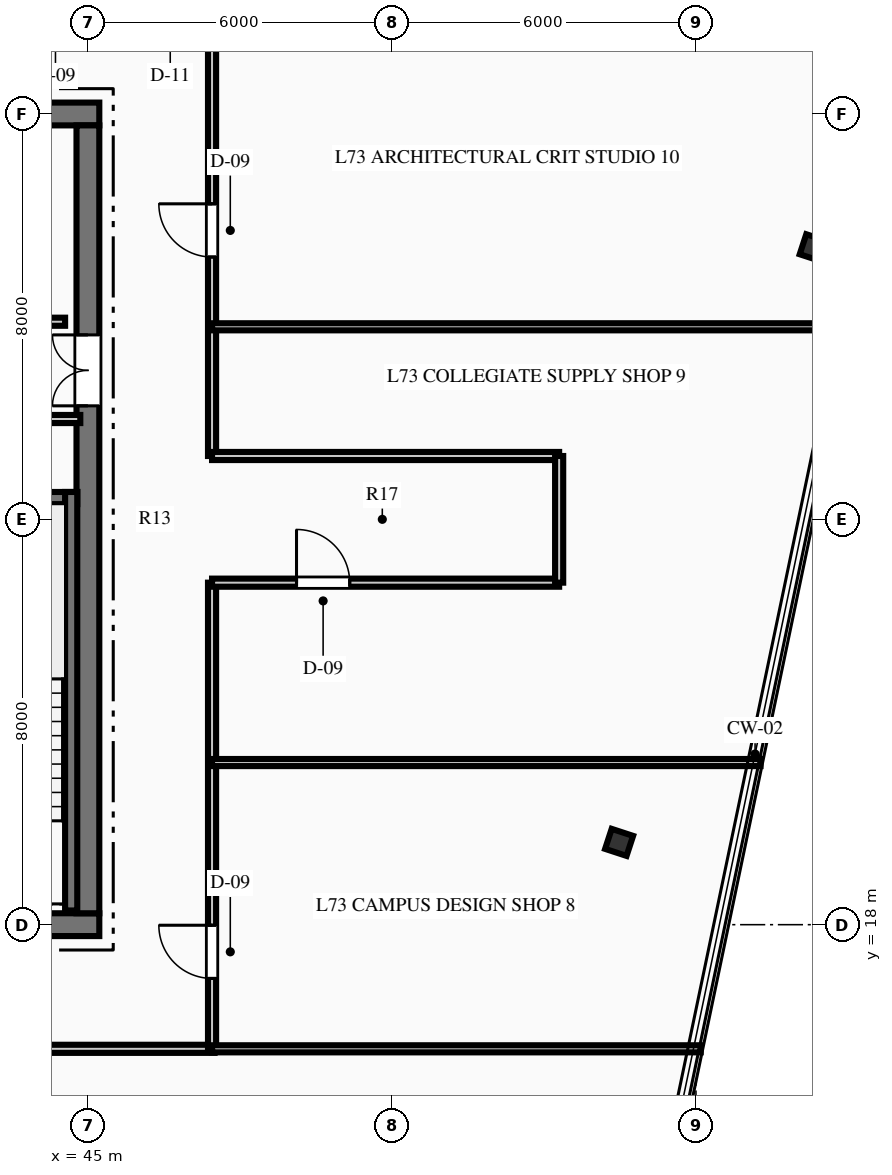
"""IFC4 building model, lengths in metres.
Left out: names, types, materials, properties, quantities, classifications, styles, units other than length and angle.
Written with IfcOpenShell. Run it as: python <this file> out.ifc"""

import sys

from ifc_helpers import new_model, si_unit, direction, frame, frame_2d, origin, origin_2d, place, context, subcontext, project, spatial, rectangle, i_section, extrude, element, fill, save


model = new_model("IFC4")
c1 = context("Model", 3, precision=1e-05, world=origin(), true_north=direction((0.0, 1.0)))
c2 = subcontext(c1, "Body", "Model", "MODEL_VIEW")
j1 = project(units=[si_unit("LENGTHUNIT", "METRE"), si_unit("PLANEANGLEUNIT", "RADIAN")], contexts=[c1])
p1 = place(None, origin())
s1 = spatial("IfcSite", under=j1, at=p1, CompositionType="ELEMENT")
p2 = place(p1, origin())
s2 = spatial("IfcBuilding", under=s1, at=p2, CompositionType="ELEMENT")
p3 = place(p2, frame((0.0, 0.0, 289.95)))
s3 = spatial("IfcBuildingStorey", under=s2, at=p3, CompositionType="ELEMENT", Elevation=289.95)
p4 = place(p3, frame((26.775, 18.0, 0.0), z_axis=(0.0, 0.0, 1.0), x_axis=(1.0, 0.0, 0.0)))
e1 = element("IfcWall", 1, at=p4, inside=s3, PredefinedType="SHEAR", context=c2, shape_type="SweptSolid", body=[
    extrude(rectangle(XDim=18.45, YDim=0.45, at=frame_2d((9.225, 0.0))), origin(), (0.0, 0.0, 1.0), 3.75),
])
p5 = place(p4, frame((7.325, 0.0, 0.0)))
e2 = element("IfcOpeningElement", 2, at=p5, cuts=e1, PredefinedType="OPENING", context=c2, shape_type="SweptSolid", body=[
    extrude(rectangle(XDim=1.1, YDim=2.15, at=frame_2d((0.55, 1.075))), frame((0.0, 0.235, 0.0), z_axis=(0.0, -1.0, 0.0), x_axis=(1.0, 0.0, 0.0)), (0.0, 0.0, 1.0), 0.47),
])
p6 = place(p4, frame((10.025, 0.0, 0.0)))
e3 = element("IfcOpeningElement", 3, at=p6, cuts=e1, PredefinedType="OPENING", context=c2, shape_type="SweptSolid", body=[
    extrude(rectangle(XDim=1.1, YDim=2.15, at=frame_2d((0.55, 1.075))), frame((0.0, 0.235, 0.0), z_axis=(0.0, -1.0, 0.0), x_axis=(1.0, 0.0, 0.0)), (0.0, 0.0, 1.0), 0.47),
])
p7 = place(p3, frame((26.775, 34.0, 0.0), z_axis=(0.0, 0.0, 1.0), x_axis=(1.0, 0.0, 0.0)))
e4 = element("IfcWall", 4, at=p7, inside=s3, PredefinedType="SHEAR", context=c2, shape_type="SweptSolid", body=[
    extrude(rectangle(XDim=18.45, YDim=0.45, at=frame_2d((9.225, 0.0))), origin(), (0.0, 0.0, 1.0), 3.75),
])
p8 = place(p3, frame((45.0, 18.225, 0.0), z_axis=(0.0, 0.0, 1.0), x_axis=(0.0, 1.0, 0.0)))
e5 = element("IfcWall", 5, at=p8, inside=s3, PredefinedType="SHEAR", context=c2, shape_type="SweptSolid", body=[
    extrude(rectangle(XDim=15.55, YDim=0.45, at=frame_2d((7.775, 0.0))), origin(), (0.0, 0.0, 1.0), 3.75),
])
p9 = place(p8, frame((10.015, 0.0, 0.0)))
e6 = element("IfcOpeningElement", 6, at=p9, cuts=e5, PredefinedType="OPENING", context=c2, shape_type="SweptSolid", body=[
    extrude(rectangle(XDim=1.4, YDim=2.2, at=frame_2d((0.7, 1.1))), frame((0.0, 0.235, 0.0), z_axis=(0.0, -1.0, 0.0), x_axis=(1.0, 0.0, 0.0)), (0.0, 0.0, 1.0), 0.47),
])
p10 = place(p3, frame((40.81, 26.42, 0.0), z_axis=(0.0, 0.0, 1.0), x_axis=(1.0, 0.0, 0.0)))
e7 = element("IfcWall", 7, at=p10, inside=s3, PredefinedType="SHEAR", context=c2, shape_type="SweptSolid", body=[
    extrude(rectangle(XDim=3.98, YDim=0.24, at=frame_2d((1.99, 0.0))), origin(), (0.0, 0.0, 1.0), 3.75),
])
p11 = place(p3, frame((44.67, 18.28, 0.0), z_axis=(0.0, 0.0, 1.0), x_axis=(0.0, 1.0, 0.0)))
e8 = element("IfcWall", 8, at=p11, inside=s3, PredefinedType="SHEAR", context=c2, shape_type="SweptSolid", body=[
    extrude(rectangle(XDim=8.26, YDim=0.24, at=frame_2d((4.13, 0.0))), origin(), (0.0, 0.0, 1.0), 3.75),
])
for number, where, z_axis, x_axis in (
    (9, (55.483, 19.624, 0.0), (0.0, 0.0, 1.0), (0.311, 0.95, 0.0)),
    (10, (59.324, 31.36, 0.0), (0.0, 0.0, 1.0), (0.311, 0.95, 0.0)),
):
    element("IfcColumn", number, at=place(p3, frame(where, z_axis=z_axis, x_axis=x_axis)), inside=s3, PredefinedType="COLUMN", context=c2, shape_type="SweptSolid", body=[
        extrude(i_section(OverallWidth=0.416, OverallDepth=0.445, WebThickness=0.039, FlangeThickness=0.063, at=origin_2d()), origin(), (0.0, 0.0, 1.0), 3.75),
    ])
p12 = place(p3, frame((40.8, 27.98, 0.0), z_axis=(0.0, 0.0, 1.0), x_axis=(1.0, 0.0, 0.0)))
e11 = element("IfcWall", 11, at=p12, inside=s3, PredefinedType="PARTITIONING", context=c2, shape_type="SweptSolid", body=[
    extrude(rectangle(XDim=4.05, YDim=0.16, at=frame_2d((2.025, 0.0))), origin(), (0.0, 0.0, 1.0), 3.34),
])
p13 = place(p12, frame((0.407, 0.0, 0.0)))
e12 = element("IfcOpeningElement", 12, at=p13, cuts=e11, PredefinedType="OPENING", context=c2, shape_type="SweptSolid", body=[
    extrude(rectangle(XDim=0.9, YDim=2.15, at=frame_2d((0.45, 1.075))), frame((0.0, 0.09, 0.0), z_axis=(0.0, -1.0, 0.0), x_axis=(1.0, 0.0, 0.0)), (0.0, 0.0, 1.0), 0.18),
])
p14 = place(p12, frame((2.2, 0.0, 0.0)))
e13 = element("IfcOpeningElement", 13, at=p14, cuts=e11, PredefinedType="OPENING", context=c2, shape_type="SweptSolid", body=[
    extrude(rectangle(XDim=0.9, YDim=2.15, at=frame_2d((0.45, 1.075))), frame((0.0, 0.09, 0.0), z_axis=(0.0, -1.0, 0.0), x_axis=(1.0, 0.0, 0.0)), (0.0, 0.0, 1.0), 0.18),
])
p15 = place(p3, frame((40.12, 29.9, 0.0), z_axis=(0.0, 0.0, 1.0), x_axis=(1.0, 0.0, 0.0)))
e14 = element("IfcWall", 14, at=p15, inside=s3, PredefinedType="PARTITIONING", context=c2, shape_type="SweptSolid", body=[
    extrude(rectangle(XDim=4.43, YDim=0.16, at=frame_2d((2.215, 0.0))), origin(), (0.0, 0.0, 1.0), 3.34),
])
p16 = place(p15, frame((0.63, 0.0, 0.0)))
e15 = element("IfcOpeningElement", 15, at=p16, cuts=e14, PredefinedType="OPENING", context=c2, shape_type="SweptSolid", body=[
    extrude(rectangle(XDim=0.9, YDim=2.15, at=frame_2d((0.45, 1.075))), frame((0.0, 0.09, 0.0), z_axis=(0.0, -1.0, 0.0), x_axis=(1.0, 0.0, 0.0)), (0.0, 0.0, 1.0), 0.18),
])
p17 = place(p15, frame((2.88, 0.0, 0.0)))
e16 = element("IfcOpeningElement", 16, at=p17, cuts=e14, PredefinedType="OPENING", context=c2, shape_type="SweptSolid", body=[
    extrude(rectangle(XDim=0.9, YDim=2.15, at=frame_2d((0.45, 1.075))), frame((0.0, 0.09, 0.0), z_axis=(0.0, -1.0, 0.0), x_axis=(1.0, 0.0, 0.0)), (0.0, 0.0, 1.0), 0.18),
])
p18 = place(p3, frame((37.25, 15.55, 0.0), z_axis=(0.0, 0.0, 1.0), x_axis=(1.0, 0.0, 0.0)))
e17 = element("IfcWall", 17, at=p18, inside=s3, PredefinedType="PARTITIONING", context=c2, shape_type="SweptSolid", body=[
    extrude(rectangle(XDim=10.25, YDim=0.16, at=frame_2d((5.125, 0.0))), origin(), (0.0, 0.0, 1.0), 3.34),
])
p19 = place(p18, frame((5.419, 0.0, 0.0)))
e18 = element("IfcOpeningElement", 18, at=p19, cuts=e17, PredefinedType="OPENING", context=c2, shape_type="SweptSolid", body=[
    extrude(rectangle(XDim=1.05, YDim=2.15, at=frame_2d((0.525, 1.075))), frame((0.0, 0.09, 0.0), z_axis=(0.0, -1.0, 0.0), x_axis=(1.0, 0.0, 0.0)), (0.0, 0.0, 1.0), 0.18),
])
p20 = place(p3, frame((47.45, 15.55, 0.0), z_axis=(0.0, 0.0, 1.0), x_axis=(0.0, 1.0, 0.0)))
e19 = element("IfcWall", 19, at=p20, inside=s3, PredefinedType="PARTITIONING", context=c2, shape_type="SweptSolid", body=[
    extrude(rectangle(XDim=9.2, YDim=0.16, at=frame_2d((4.6, 0.0))), origin(), (0.0, 0.0, 1.0), 3.34),
])
p21 = place(p20, frame((1.389, 0.0, 0.0)))
e20 = element("IfcOpeningElement", 20, at=p21, cuts=e19, PredefinedType="OPENING", context=c2, shape_type="SweptSolid", body=[
    extrude(rectangle(XDim=1.05, YDim=2.15, at=frame_2d((0.525, 1.075))), frame((0.0, 0.09, 0.0), z_axis=(0.0, -1.0, 0.0), x_axis=(1.0, 0.0, 0.0)), (0.0, 0.0, 1.0), 0.18),
])
p22 = place(p3, frame((47.45, 27.25, 0.0), z_axis=(0.0, 0.0, 1.0), x_axis=(0.0, 1.0, 0.0)))
e21 = element("IfcWall", 21, at=p22, inside=s3, PredefinedType="PARTITIONING", context=c2, shape_type="SweptSolid", body=[
    extrude(rectangle(XDim=9.2, YDim=0.16, at=frame_2d((4.6, 0.0))), origin(), (0.0, 0.0, 1.0), 3.34),
])
p23 = place(p22, frame((3.927, 0.0, 0.0)))
e22 = element("IfcOpeningElement", 22, at=p23, cuts=e21, PredefinedType="OPENING", context=c2, shape_type="SweptSolid", body=[
    extrude(rectangle(XDim=1.05, YDim=2.15, at=frame_2d((0.525, 1.075))), frame((0.0, 0.09, 0.0), z_axis=(0.0, -1.0, 0.0), x_axis=(1.0, 0.0, 0.0)), (0.0, 0.0, 1.0), 0.18),
])
p24 = place(p3, frame((47.45, 24.75, 0.0), z_axis=(0.0, 0.0, 1.0), x_axis=(1.0, 0.0, 0.0)))
e23 = element("IfcWall", 23, at=p24, inside=s3, PredefinedType="PARTITIONING", context=c2, shape_type="SweptSolid", body=[
    extrude(rectangle(XDim=6.85, YDim=0.16, at=frame_2d((3.425, 0.0))), origin(), (0.0, 0.0, 1.0), 3.34),
])
p25 = place(p24, frame((1.667, 0.0, 0.0)))
e24 = element("IfcOpeningElement", 24, at=p25, cuts=e23, PredefinedType="OPENING", context=c2, shape_type="SweptSolid", body=[
    extrude(rectangle(XDim=1.05, YDim=2.15, at=frame_2d((0.525, 1.075))), frame((0.0, 0.09, 0.0), z_axis=(0.0, -1.0, 0.0), x_axis=(1.0, 0.0, 0.0)), (0.0, 0.0, 1.0), 0.18),
])
p26 = place(p3, frame((47.45, 27.25, 0.0), z_axis=(0.0, 0.0, 1.0), x_axis=(1.0, 0.0, 0.0)))
e25 = element("IfcWall", 25, at=p26, inside=s3, PredefinedType="PARTITIONING", context=c2, shape_type="SweptSolid", body=[
    extrude(rectangle(XDim=6.85, YDim=0.16, at=frame_2d((3.425, 0.0))), origin(), (0.0, 0.0, 1.0), 3.34),
])
p27 = place(p3, frame((54.3, 24.75, 0.0), z_axis=(0.0, 0.0, 1.0), x_axis=(0.0, 1.0, 0.0)))
e26 = element("IfcWall", 26, at=p27, inside=s3, PredefinedType="PARTITIONING", context=c2, shape_type="SweptSolid", body=[
    extrude(rectangle(XDim=2.5, YDim=0.16, at=frame_2d((1.25, 0.0))), origin(), (0.0, 0.0, 1.0), 3.34),
])
p28 = place(p3, frame((47.45, 15.55, 0.0), z_axis=(0.0, 0.0, 1.0), x_axis=(1.0, 0.0, 0.0)))
e27 = element("IfcWall", 27, at=p28, inside=s3, PredefinedType="PARTITIONING", context=c2, shape_type="SweptSolid", body=[
    extrude(rectangle(XDim=9.644, YDim=0.14, at=frame_2d((4.822, 0.0))), origin(), (0.0, 0.0, 1.0), 3.34),
])
p29 = place(p3, frame((47.45, 21.2, 0.0), z_axis=(0.0, 0.0, 1.0), x_axis=(1.0, 0.0, 0.0)))
e28 = element("IfcWall", 28, at=p29, inside=s3, PredefinedType="PARTITIONING", context=c2, shape_type="SweptSolid", body=[
    extrude(rectangle(XDim=10.824, YDim=0.14, at=frame_2d((5.412, 0.0))), origin(), (0.0, 0.0, 1.0), 3.34),
])
p30 = place(p3, frame((47.45, 29.8, 0.0), z_axis=(0.0, 0.0, 1.0), x_axis=(1.0, 0.0, 0.0)))
e29 = element("IfcWall", 29, at=p30, inside=s3, PredefinedType="PARTITIONING", context=c2, shape_type="SweptSolid", body=[
    extrude(rectangle(XDim=12.621, YDim=0.14, at=frame_2d((6.311, 0.0))), origin(), (0.0, 0.0, 1.0), 3.34),
])
p31 = place(p9, origin())
e30 = element("IfcDoor", 30, at=p31, inside=s3, OperationType="DOUBLE_DOOR_SINGLE_SWING", PredefinedType="DOOR", context=c2, shape_type="SweptSolid", body=[
    extrude(rectangle(XDim=1.4, YDim=2.2, at=frame_2d((0.7, 1.1))), frame((0.0, 0.025, 0.0), z_axis=(0.0, -1.0, 0.0), x_axis=(1.0, 0.0, 0.0)), (0.0, 0.0, 1.0), 0.05),
])
fill(e6, e30)
p32 = place(p21, origin())
e31 = element("IfcDoor", 31, at=p32, inside=s3, OperationType="SINGLE_SWING_RIGHT", PredefinedType="DOOR", context=c2, shape_type="SweptSolid", body=[
    extrude(rectangle(XDim=1.05, YDim=2.15, at=frame_2d((0.525, 1.075))), frame((0.0, 0.025, 0.0), z_axis=(0.0, -1.0, 0.0), x_axis=(1.0, 0.0, 0.0)), (0.0, 0.0, 1.0), 0.05),
])
fill(e20, e31)
p33 = place(p25, origin())
e32 = element("IfcDoor", 32, at=p33, inside=s3, OperationType="SINGLE_SWING_LEFT", PredefinedType="DOOR", context=c2, shape_type="SweptSolid", body=[
    extrude(rectangle(XDim=1.05, YDim=2.15, at=frame_2d((0.525, 1.075))), frame((0.0, 0.025, 0.0), z_axis=(0.0, -1.0, 0.0), x_axis=(1.0, 0.0, 0.0)), (0.0, 0.0, 1.0), 0.05),
])
fill(e24, e32)
p34 = place(p23, origin())
e33 = element("IfcDoor", 33, at=p34, inside=s3, OperationType="SINGLE_SWING_RIGHT", PredefinedType="DOOR", context=c2, shape_type="SweptSolid", body=[
    extrude(rectangle(XDim=1.05, YDim=2.15, at=frame_2d((0.525, 1.075))), frame((0.0, 0.025, 0.0), z_axis=(0.0, -1.0, 0.0), x_axis=(1.0, 0.0, 0.0)), (0.0, 0.0, 1.0), 0.05),
])
fill(e22, e33)
save(model, sys.argv[1])
